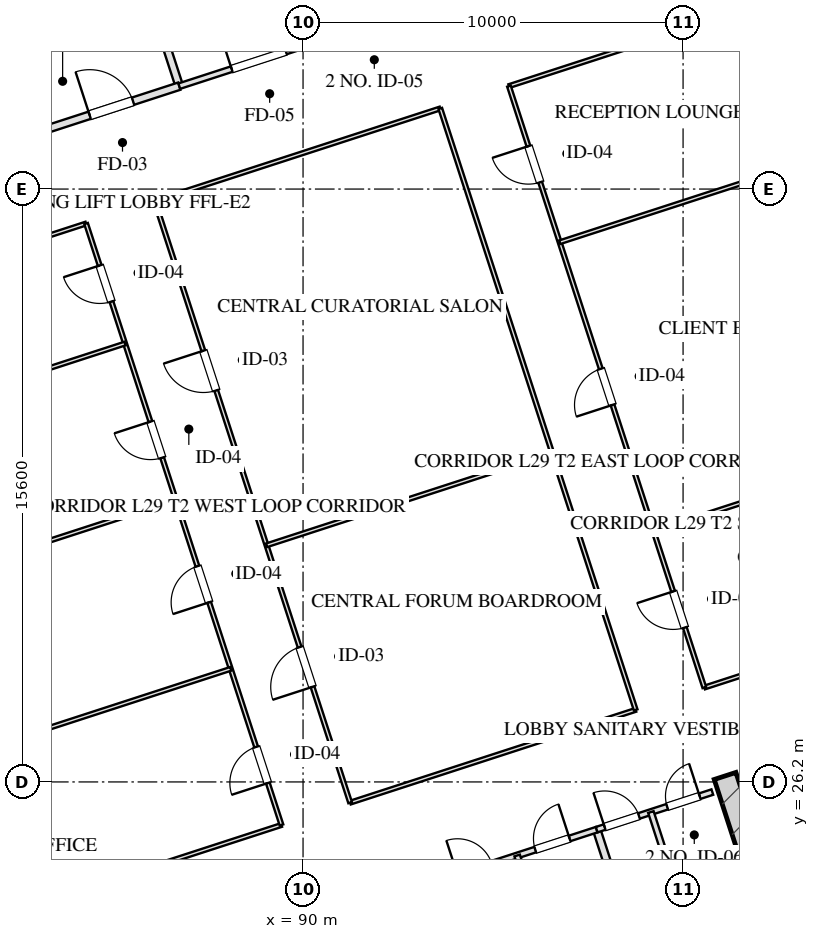
"""IFC4 building model, lengths in metres.
Left out: names, types, materials, properties, quantities, classifications, styles, units other than length and angle.
Written with IfcOpenShell. Run it as: python <this file> out.ifc"""

import sys

from ifc_helpers import new_model, si_unit, direction, frame, frame_2d, origin, place, context, subcontext, project, spatial, rectangle, extrude, element, fill, save


model = new_model("IFC4")
c1 = context("Model", 3, precision=1e-05, world=origin(), true_north=direction((0.0, 1.0)))
c2 = subcontext(c1, "Body", "Model", "MODEL_VIEW")
j1 = project(units=[si_unit("LENGTHUNIT", "METRE"), si_unit("PLANEANGLEUNIT", "RADIAN")], contexts=[c1])
p1 = place(None, origin())
s1 = spatial("IfcSite", under=j1, at=p1, CompositionType="ELEMENT")
p2 = place(p1, origin())
s2 = spatial("IfcBuilding", under=s1, at=p2, CompositionType="ELEMENT")
p3 = place(p2, frame((0.0, 0.0, 113.85)))
s3 = spatial("IfcBuildingStorey", under=s2, at=p3, CompositionType="ELEMENT", Elevation=113.85)
p4 = place(p3, frame((101.105, 26.358, 0.0), z_axis=(0.0, 0.0, 1.0), x_axis=(0.309010370028, -0.95105866865, 0.0)))
e1 = element("IfcWall", 1, at=p4, inside=s3, PredefinedType="SHEAR", context=c2, shape_type="SweptSolid", body=[
    extrude(rectangle(XDim=9.48, YDim=0.6, at=frame_2d((4.74, 0.0))), origin(), (0.0, 0.0, 1.0), 3.45),
])
p5 = place(p3, frame((99.284, 61.41, 0.0), z_axis=(0.0, 0.0, 1.0), x_axis=(0.309017542002, -0.95105633836, 0.0)))
e2 = element("IfcWall", 2, at=p5, inside=s3, PredefinedType="SOLIDWALL", context=c2, shape_type="SweptSolid", body=[
    extrude(rectangle(XDim=46.4, YDim=0.4, at=frame_2d((23.2, 0.0))), origin(), (0.0, 0.0, 1.0), 2.61),
])
p6 = place(p5, frame((28.4, 0.0, 0.75)))
e3 = element("IfcOpeningElement", 3, at=p6, cuts=e2, PredefinedType="OPENING", context=c2, shape_type="SweptSolid", body=[
    extrude(rectangle(XDim=2.4, YDim=1.46, at=frame_2d((1.2, 0.73))), frame((0.0, 0.21, 0.0), z_axis=(0.0, -1.0, 0.0), x_axis=(1.0, 0.0, 0.0)), (0.0, 0.0, 1.0), 0.42),
])
p7 = place(p5, frame((16.85, 0.0, 0.0)))
e4 = element("IfcOpeningElement", 4, at=p7, cuts=e2, PredefinedType="OPENING", context=c2, shape_type="SweptSolid", body=[
    extrude(rectangle(XDim=1.1, YDim=2.15, at=frame_2d((0.55, 1.075))), frame((0.0, 0.21, 0.0), z_axis=(0.0, -1.0, 0.0), x_axis=(1.0, 0.0, 0.0)), (0.0, 0.0, 1.0), 0.42),
])
p8 = place(p3, frame((97.727, 24.944, 0.0), z_axis=(0.0, 0.0, 1.0), x_axis=(0.309016001439, -0.951056838919, 0.0)))
e5 = element("IfcWall", 5, at=p8, inside=s3, PredefinedType="PARTITIONING", context=c2, shape_type="SweptSolid", body=[
    extrude(rectangle(XDim=8.43, YDim=0.2, at=frame_2d((4.215, 0.0))), origin(), (0.0, 0.0, 1.0), 3.175),
])
p9 = place(p3, frame((93.542, 23.585, 0.0), z_axis=(0.0, 0.0, 1.0), x_axis=(0.951063829732, 0.308994485023, 0.0)))
e6 = element("IfcWall", 6, at=p9, inside=s3, PredefinedType="PARTITIONING", context=c2, shape_type="SweptSolid", body=[
    extrude(rectangle(XDim=4.4, YDim=0.15, at=frame_2d((2.2, 0.0))), origin(), (0.0, 0.0, 1.0), 3.175),
])
p10 = place(p9, frame((0.55, 0.0, 0.0)))
e7 = element("IfcOpeningElement", 7, at=p10, cuts=e6, PredefinedType="OPENING", context=c2, shape_type="SweptSolid", body=[
    extrude(rectangle(XDim=0.95, YDim=2.05, at=frame_2d((0.475, 1.025))), frame((0.0, 0.085, 0.0), z_axis=(0.0, -1.0, 0.0), x_axis=(1.0, 0.0, 0.0)), (0.0, 0.0, 1.0), 0.17),
])
p11 = place(p9, frame((2.7, 0.0, 0.0)))
e8 = element("IfcOpeningElement", 8, at=p11, cuts=e6, PredefinedType="OPENING", context=c2, shape_type="SweptSolid", body=[
    extrude(rectangle(XDim=0.95, YDim=2.05, at=frame_2d((0.475, 1.025))), frame((0.0, 0.085, 0.0), z_axis=(0.0, -1.0, 0.0), x_axis=(1.0, 0.0, 0.0)), (0.0, 0.0, 1.0), 0.17),
])
p12 = place(p3, frame((95.634, 24.265, 0.0), z_axis=(0.0, 0.0, 1.0), x_axis=(0.309007490203, -0.951059604335, 0.0)))
e9 = element("IfcWall", 9, at=p12, inside=s3, PredefinedType="PARTITIONING", context=c2, shape_type="SweptSolid", body=[
    extrude(rectangle(XDim=8.43, YDim=0.15, at=frame_2d((4.215, 0.0))), origin(), (0.0, 0.0, 1.0), 3.175),
])
p13 = place(p3, frame((97.727, 24.944, 0.0), z_axis=(0.0, 0.0, 1.0), x_axis=(0.951036872128, 0.309077446369, 0.0)))
e10 = element("IfcWall", 10, at=p13, inside=s3, PredefinedType="PARTITIONING", context=c2, shape_type="SweptSolid", body=[
    extrude(rectangle(XDim=3.2, YDim=0.15, at=frame_2d((1.6, 0.0))), origin(), (0.0, 0.0, 1.0), 3.175),
])
p14 = place(p13, frame((0.22, 0.0, 0.0)))
e11 = element("IfcOpeningElement", 11, at=p14, cuts=e10, PredefinedType="OPENING", context=c2, shape_type="SweptSolid", body=[
    extrude(rectangle(XDim=0.95, YDim=2.05, at=frame_2d((0.475, 1.025))), frame((0.0, 0.085, 0.0), z_axis=(0.0, -1.0, 0.0), x_axis=(1.0, 0.0, 0.0)), (0.0, 0.0, 1.0), 0.17),
])
p15 = place(p13, frame((1.95, 0.0, 0.0)))
e12 = element("IfcOpeningElement", 12, at=p15, cuts=e10, PredefinedType="OPENING", context=c2, shape_type="SweptSolid", body=[
    extrude(rectangle(XDim=0.9, YDim=2.05, at=frame_2d((0.45, 1.025))), frame((0.0, 0.085, 0.0), z_axis=(0.0, -1.0, 0.0), x_axis=(1.0, 0.0, 0.0)), (0.0, 0.0, 1.0), 0.17),
])
p16 = place(p3, frame((99.153, 25.408, 0.0), z_axis=(0.0, 0.0, 1.0), x_axis=(0.309016001439, -0.951056838919, 0.0)))
e13 = element("IfcWall", 13, at=p16, inside=s3, PredefinedType="PARTITIONING", context=c2, shape_type="SweptSolid", body=[
    extrude(rectangle(XDim=8.43, YDim=0.15, at=frame_2d((4.215, 0.0))), origin(), (0.0, 0.0, 1.0), 3.175),
])
p17 = place(p16, frame((2.55, 0.0, 0.0)))
e14 = element("IfcOpeningElement", 14, at=p17, cuts=e13, PredefinedType="OPENING", context=c2, shape_type="SweptSolid", body=[
    extrude(rectangle(XDim=0.95, YDim=2.05, at=frame_2d((0.475, 1.025))), frame((0.0, 0.085, 0.0), z_axis=(0.0, -1.0, 0.0), x_axis=(1.0, 0.0, 0.0)), (0.0, 0.0, 1.0), 0.17),
])
p18 = place(p16, frame((5.6, 0.0, 0.0)))
e15 = element("IfcOpeningElement", 15, at=p18, cuts=e13, PredefinedType="OPENING", context=c2, shape_type="SweptSolid", body=[
    extrude(rectangle(XDim=0.9, YDim=2.05, at=frame_2d((0.45, 1.025))), frame((0.0, 0.085, 0.0), z_axis=(0.0, -1.0, 0.0), x_axis=(1.0, 0.0, 0.0)), (0.0, 0.0, 1.0), 0.17),
])
p19 = place(p3, frame((86.743, 44.508, 0.0), z_axis=(0.0, 0.0, 1.0), x_axis=(-0.309016001439, 0.951056838919, 0.0)))
e16 = element("IfcWall", 16, at=p19, inside=s3, PredefinedType="PARTITIONING", context=c2, shape_type="SweptSolid", body=[
    extrude(rectangle(XDim=8.43, YDim=0.2, at=frame_2d((4.215, 0.0))), origin(), (0.0, 0.0, 1.0), 3.175),
])
p20 = place(p3, frame((83.101, 43.324, 0.0), z_axis=(0.0, 0.0, 1.0), x_axis=(0.951052804469, 0.309028417967, 0.0)))
e17 = element("IfcWall", 17, at=p20, inside=s3, PredefinedType="PARTITIONING", context=c2, shape_type="SweptSolid", body=[
    extrude(rectangle(XDim=3.83, YDim=0.2, at=frame_2d((1.915, 0.0))), origin(), (0.0, 0.0, 1.0), 3.175),
])
p21 = place(p20, frame((1.35, 0.0, 0.0)))
e18 = element("IfcOpeningElement", 18, at=p21, cuts=e17, PredefinedType="OPENING", context=c2, shape_type="SweptSolid", body=[
    extrude(rectangle(XDim=1.2, YDim=2.05, at=frame_2d((0.6, 1.025))), frame((0.0, 0.11, 0.0), z_axis=(0.0, -1.0, 0.0), x_axis=(1.0, 0.0, 0.0)), (0.0, 0.0, 1.0), 0.22),
])
p22 = place(p3, frame((86.743, 44.508, 0.0), z_axis=(0.0, 0.0, 1.0), x_axis=(0.951063829732, 0.308994485023, 0.0)))
e19 = element("IfcWall", 19, at=p22, inside=s3, PredefinedType="PARTITIONING", context=c2, shape_type="SweptSolid", body=[
    extrude(rectangle(XDim=4.4, YDim=0.15, at=frame_2d((2.2, 0.0))), origin(), (0.0, 0.0, 1.0), 3.175),
])
p23 = place(p22, frame((1.45, 0.0, 0.0)))
e20 = element("IfcOpeningElement", 20, at=p23, cuts=e19, PredefinedType="OPENING", context=c2, shape_type="SweptSolid", body=[
    extrude(rectangle(XDim=1.5, YDim=2.05, at=frame_2d((0.75, 1.025))), frame((0.0, 0.085, 0.0), z_axis=(0.0, -1.0, 0.0), x_axis=(1.0, 0.0, 0.0)), (0.0, 0.0, 1.0), 0.17),
])
p24 = place(p3, frame((76.308, 20.803, 0.0), z_axis=(0.0, 0.0, 1.0), x_axis=(0.951058377365, 0.309011266531, 0.0)))
e21 = element("IfcWall", 21, at=p24, inside=s3, PredefinedType="MOVABLE", context=c2, shape_type="SweptSolid", body=[
    extrude(rectangle(XDim=13.8, YDim=0.1, at=frame_2d((6.9, 0.0))), origin(), (0.0, 0.0, 1.0), 3.175),
])
p25 = place(p3, frame((91.24, 25.655, 0.0), z_axis=(0.0, 0.0, 1.0), x_axis=(0.951060182336, 0.309005711233, 0.0)))
e22 = element("IfcWall", 22, at=p25, inside=s3, PredefinedType="MOVABLE", context=c2, shape_type="SweptSolid", body=[
    extrude(rectangle(XDim=7.9, YDim=0.1, at=frame_2d((3.95, 0.0))), origin(), (0.0, 0.0, 1.0), 3.175),
])
p26 = place(p3, frame((100.56, 28.683, 0.0), z_axis=(0.0, 0.0, 1.0), x_axis=(0.951055307445, 0.309020714809, 0.0)))
e23 = element("IfcWall", 23, at=p26, inside=s3, PredefinedType="MOVABLE", context=c2, shape_type="SweptSolid", body=[
    extrude(rectangle(XDim=8.7, YDim=0.1, at=frame_2d((4.35, 0.0))), origin(), (0.0, 0.0, 1.0), 3.175),
])
p27 = place(p3, frame((71.166, 36.629, 0.0), z_axis=(0.0, 0.0, 1.0), x_axis=(0.951056688031, 0.309016465825, 0.0)))
e24 = element("IfcWall", 24, at=p27, inside=s3, PredefinedType="MOVABLE", context=c2, shape_type="SweptSolid", body=[
    extrude(rectangle(XDim=13.8, YDim=0.1, at=frame_2d((6.9, 0.0))), origin(), (0.0, 0.0, 1.0), 3.175),
])
p28 = place(p3, frame((86.097, 41.48, 0.0), z_axis=(0.0, 0.0, 1.0), x_axis=(0.951060182336, 0.309005711233, 0.0)))
e25 = element("IfcWall", 25, at=p28, inside=s3, PredefinedType="MOVABLE", context=c2, shape_type="SweptSolid", body=[
    extrude(rectangle(XDim=7.9, YDim=0.1, at=frame_2d((3.95, 0.0))), origin(), (0.0, 0.0, 1.0), 3.175),
])
p29 = place(p3, frame((95.418, 44.509, 0.0), z_axis=(0.0, 0.0, 1.0), x_axis=(0.951055307445, 0.309020714809, 0.0)))
e26 = element("IfcWall", 26, at=p29, inside=s3, PredefinedType="MOVABLE", context=c2, shape_type="SweptSolid", body=[
    extrude(rectangle(XDim=8.7, YDim=0.1, at=frame_2d((4.35, 0.0))), origin(), (0.0, 0.0, 1.0), 3.175),
])
p30 = place(p3, frame((89.433, 25.067, 0.0), z_axis=(0.0, 0.0, 1.0), x_axis=(-0.30901773025, 0.951056277195, 0.0)))
e27 = element("IfcWall", 27, at=p30, inside=s3, PredefinedType="MOVABLE", context=c2, shape_type="SweptSolid", body=[
    extrude(rectangle(XDim=16.64, YDim=0.1, at=frame_2d((8.32, 0.0))), origin(), (0.0, 0.0, 1.0), 3.175),
])
p31 = place(p30, frame((1.16, 0.0, 0.0)))
e28 = element("IfcOpeningElement", 28, at=p31, cuts=e27, PredefinedType="OPENING", context=c2, shape_type="SweptSolid", body=[
    extrude(rectangle(XDim=1.0, YDim=2.05, at=frame_2d((0.5, 1.025))), frame((0.0, 0.06, 0.0), z_axis=(0.0, -1.0, 0.0), x_axis=(1.0, 0.0, 0.0)), (0.0, 0.0, 1.0), 0.12),
])
p32 = place(p30, frame((6.16, 0.0, 0.0)))
e29 = element("IfcOpeningElement", 29, at=p32, cuts=e27, PredefinedType="OPENING", context=c2, shape_type="SweptSolid", body=[
    extrude(rectangle(XDim=1.0, YDim=2.05, at=frame_2d((0.5, 1.025))), frame((0.0, 0.06, 0.0), z_axis=(0.0, -1.0, 0.0), x_axis=(1.0, 0.0, 0.0)), (0.0, 0.0, 1.0), 0.12),
])
p33 = place(p30, frame((10.16, 0.0, 0.0)))
e30 = element("IfcOpeningElement", 30, at=p33, cuts=e27, PredefinedType="OPENING", context=c2, shape_type="SweptSolid", body=[
    extrude(rectangle(XDim=1.0, YDim=2.05, at=frame_2d((0.5, 1.025))), frame((0.0, 0.06, 0.0), z_axis=(0.0, -1.0, 0.0), x_axis=(1.0, 0.0, 0.0)), (0.0, 0.0, 1.0), 0.12),
])
p34 = place(p30, frame((14.48, 0.0, 0.0)))
e31 = element("IfcOpeningElement", 31, at=p34, cuts=e27, PredefinedType="OPENING", context=c2, shape_type="SweptSolid", body=[
    extrude(rectangle(XDim=1.0, YDim=2.05, at=frame_2d((0.5, 1.025))), frame((0.0, 0.06, 0.0), z_axis=(0.0, -1.0, 0.0), x_axis=(1.0, 0.0, 0.0)), (0.0, 0.0, 1.0), 0.12),
])
p35 = place(p3, frame((91.24, 25.655, 0.0), z_axis=(0.0, 0.0, 1.0), x_axis=(-0.30901773025, 0.951056277195, 0.0)))
e32 = element("IfcWall", 32, at=p35, inside=s3, PredefinedType="MOVABLE", context=c2, shape_type="SweptSolid", body=[
    extrude(rectangle(XDim=16.64, YDim=0.1, at=frame_2d((8.32, 0.0))), origin(), (0.0, 0.0, 1.0), 3.175),
])
p36 = place(p35, frame((3.204, 0.0, 0.0)))
e33 = element("IfcOpeningElement", 33, at=p36, cuts=e32, PredefinedType="OPENING", context=c2, shape_type="SweptSolid", body=[
    extrude(rectangle(XDim=1.1, YDim=2.05, at=frame_2d((0.55, 1.025))), frame((0.0, 0.06, 0.0), z_axis=(0.0, -1.0, 0.0), x_axis=(1.0, 0.0, 0.0)), (0.0, 0.0, 1.0), 0.12),
])
p37 = place(p35, frame((11.404, 0.0, 0.0)))
e34 = element("IfcOpeningElement", 34, at=p37, cuts=e32, PredefinedType="OPENING", context=c2, shape_type="SweptSolid", body=[
    extrude(rectangle(XDim=1.1, YDim=2.05, at=frame_2d((0.55, 1.025))), frame((0.0, 0.06, 0.0), z_axis=(0.0, -1.0, 0.0), x_axis=(1.0, 0.0, 0.0)), (0.0, 0.0, 1.0), 0.12),
])
p38 = place(p3, frame((98.753, 28.096, 0.0), z_axis=(0.0, 0.0, 1.0), x_axis=(-0.30901773025, 0.951056277195, 0.0)))
e35 = element("IfcWall", 35, at=p38, inside=s3, PredefinedType="MOVABLE", context=c2, shape_type="SweptSolid", body=[
    extrude(rectangle(XDim=16.64, YDim=0.1, at=frame_2d((8.32, 0.0))), origin(), (0.0, 0.0, 1.0), 3.175),
])
p39 = place(p3, frame((100.56, 28.683, 0.0), z_axis=(0.0, 0.0, 1.0), x_axis=(-0.309004459387, 0.951060589068, 0.0)))
e36 = element("IfcWall", 36, at=p39, inside=s3, PredefinedType="MOVABLE", context=c2, shape_type="SweptSolid", body=[
    extrude(rectangle(XDim=16.64, YDim=0.1, at=frame_2d((8.32, 0.0))), origin(), (0.0, 0.0, 1.0), 3.175),
])
p40 = place(p39, frame((1.66, 0.0, 0.0)))
e37 = element("IfcOpeningElement", 37, at=p40, cuts=e36, PredefinedType="OPENING", context=c2, shape_type="SweptSolid", body=[
    extrude(rectangle(XDim=1.0, YDim=2.05, at=frame_2d((0.5, 1.025))), frame((0.0, 0.06, 0.0), z_axis=(0.0, -1.0, 0.0), x_axis=(1.0, 0.0, 0.0)), (0.0, 0.0, 1.0), 0.12),
])
p41 = place(p39, frame((7.82, 0.0, 0.0)))
e38 = element("IfcOpeningElement", 38, at=p41, cuts=e36, PredefinedType="OPENING", context=c2, shape_type="SweptSolid", body=[
    extrude(rectangle(XDim=1.0, YDim=2.05, at=frame_2d((0.5, 1.025))), frame((0.0, 0.06, 0.0), z_axis=(0.0, -1.0, 0.0), x_axis=(1.0, 0.0, 0.0)), (0.0, 0.0, 1.0), 0.12),
])
p42 = place(p39, frame((13.98, 0.0, 0.0)))
e39 = element("IfcOpeningElement", 39, at=p42, cuts=e36, PredefinedType="OPENING", context=c2, shape_type="SweptSolid", body=[
    extrude(rectangle(XDim=1.0, YDim=2.05, at=frame_2d((0.5, 1.025))), frame((0.0, 0.06, 0.0), z_axis=(0.0, -1.0, 0.0), x_axis=(1.0, 0.0, 0.0)), (0.0, 0.0, 1.0), 0.12),
])
p43 = place(p3, frame((89.039, 32.426, 0.0), z_axis=(0.0, 0.0, 1.0), x_axis=(0.951051099951, 0.309033663672, 0.0)))
e40 = element("IfcWall", 40, at=p43, inside=s3, PredefinedType="MOVABLE", context=c2, shape_type="SweptSolid", body=[
    extrude(rectangle(XDim=7.9, YDim=0.1, at=frame_2d((3.95, 0.0))), origin(), (0.0, 0.0, 1.0), 3.175),
])
p44 = place(p3, frame((74.973, 24.912, 0.0), z_axis=(0.0, 0.0, 1.0), x_axis=(0.951058377365, 0.309011266531, 0.0)))
e41 = element("IfcWall", 41, at=p44, inside=s3, PredefinedType="MOVABLE", context=c2, shape_type="SweptSolid", body=[
    extrude(rectangle(XDim=13.8, YDim=0.1, at=frame_2d((6.9, 0.0))), origin(), (0.0, 0.0, 1.0), 3.175),
])
for number, where, z_axis, x_axis in (
    (42, (73.527, 29.363, 0.0), (0.0, 0.0, 1.0), (0.951, 0.309, 0.0)),
    (43, (72.192, 33.471, 0.0), (0.0, 0.0, 1.0), (0.951, 0.309, 0.0)),
):
    element("IfcWall", number, at=place(p3, frame(where, z_axis=z_axis, x_axis=x_axis)), inside=s3, PredefinedType="MOVABLE", context=c2, shape_type="SweptSolid", body=[
        extrude(rectangle(XDim=13.8, YDim=0.1, at=frame_2d((6.9, 0.0))), origin(), (0.0, 0.0, 1.0), 3.175),
    ])
p45 = place(p3, frame((99.225, 32.792, 0.0), z_axis=(0.0, 0.0, 1.0), x_axis=(0.951055307445, 0.309020714809, 0.0)))
e44 = element("IfcWall", 44, at=p45, inside=s3, PredefinedType="MOVABLE", context=c2, shape_type="SweptSolid", body=[
    extrude(rectangle(XDim=8.7, YDim=0.1, at=frame_2d((4.35, 0.0))), origin(), (0.0, 0.0, 1.0), 3.175),
])
p46 = place(p3, frame((96.753, 40.4, 0.0), z_axis=(0.0, 0.0, 1.0), x_axis=(0.951057987102, 0.309012467661, 0.0)))
e45 = element("IfcWall", 45, at=p46, inside=s3, PredefinedType="MOVABLE", context=c2, shape_type="SweptSolid", body=[
    extrude(rectangle(XDim=8.7, YDim=0.1, at=frame_2d((4.35, 0.0))), origin(), (0.0, 0.0, 1.0), 3.175),
])
p47 = place(p11, origin())
e46 = element("IfcDoor", 46, at=p47, inside=s3, OperationType="SINGLE_SWING_RIGHT", PredefinedType="DOOR", context=c2, shape_type="SweptSolid", body=[
    extrude(rectangle(XDim=0.95, YDim=2.05, at=frame_2d((0.475, 1.025))), frame((0.0, 0.025, 0.0), z_axis=(0.0, -1.0, 0.0), x_axis=(1.0, 0.0, 0.0)), (0.0, 0.0, 1.0), 0.05),
])
fill(e8, e46)
p48 = place(p14, origin())
e47 = element("IfcDoor", 47, at=p48, inside=s3, OperationType="SINGLE_SWING_LEFT", PredefinedType="DOOR", context=c2, shape_type="SweptSolid", body=[
    extrude(rectangle(XDim=0.95, YDim=2.05, at=frame_2d((0.475, 1.025))), frame((0.0, 0.025, 0.0), z_axis=(0.0, -1.0, 0.0), x_axis=(1.0, 0.0, 0.0)), (0.0, 0.0, 1.0), 0.05),
])
fill(e11, e47)
p49 = place(p15, origin())
e48 = element("IfcDoor", 48, at=p49, inside=s3, OperationType="SINGLE_SWING_RIGHT", PredefinedType="DOOR", context=c2, shape_type="SweptSolid", body=[
    extrude(rectangle(XDim=0.9, YDim=2.05, at=frame_2d((0.45, 1.025))), frame((0.0, 0.025, 0.0), z_axis=(0.0, -1.0, 0.0), x_axis=(1.0, 0.0, 0.0)), (0.0, 0.0, 1.0), 0.05),
])
fill(e12, e48)
p50 = place(p21, origin())
e49 = element("IfcDoor", 49, at=p50, inside=s3, OperationType="SINGLE_SWING_LEFT", PredefinedType="DOOR", context=c2, shape_type="SweptSolid", body=[
    extrude(rectangle(XDim=1.2, YDim=2.05, at=frame_2d((0.6, 1.025))), frame((0.0, 0.025, 0.0), z_axis=(0.0, -1.0, 0.0), x_axis=(1.0, 0.0, 0.0)), (0.0, 0.0, 1.0), 0.05),
])
fill(e18, e49)
p51 = place(p23, origin())
e50 = element("IfcDoor", 50, at=p51, inside=s3, OperationType="SINGLE_SWING_LEFT", PredefinedType="DOOR", context=c2, shape_type="SweptSolid", body=[
    extrude(rectangle(XDim=1.5, YDim=2.05, at=frame_2d((0.75, 1.025))), frame((0.0, 0.025, 0.0), z_axis=(0.0, -1.0, 0.0), x_axis=(1.0, 0.0, 0.0)), (0.0, 0.0, 1.0), 0.05),
])
fill(e20, e50)
p52 = place(p31, origin())
e51 = element("IfcDoor", 51, at=p52, inside=s3, OperationType="SINGLE_SWING_LEFT", PredefinedType="DOOR", context=c2, shape_type="SweptSolid", body=[
    extrude(rectangle(XDim=1.0, YDim=2.05, at=frame_2d((0.5, 1.025))), frame((0.0, 0.025, 0.0), z_axis=(0.0, -1.0, 0.0), x_axis=(1.0, 0.0, 0.0)), (0.0, 0.0, 1.0), 0.05),
])
fill(e28, e51)
p53 = place(p32, origin())
e52 = element("IfcDoor", 52, at=p53, inside=s3, OperationType="SINGLE_SWING_LEFT", PredefinedType="DOOR", context=c2, shape_type="SweptSolid", body=[
    extrude(rectangle(XDim=1.0, YDim=2.05, at=frame_2d((0.5, 1.025))), frame((0.0, 0.025, 0.0), z_axis=(0.0, -1.0, 0.0), x_axis=(1.0, 0.0, 0.0)), (0.0, 0.0, 1.0), 0.05),
])
fill(e29, e52)
p54 = place(p33, origin())
e53 = element("IfcDoor", 53, at=p54, inside=s3, OperationType="SINGLE_SWING_RIGHT", PredefinedType="DOOR", context=c2, shape_type="SweptSolid", body=[
    extrude(rectangle(XDim=1.0, YDim=2.05, at=frame_2d((0.5, 1.025))), frame((0.0, 0.025, 0.0), z_axis=(0.0, -1.0, 0.0), x_axis=(1.0, 0.0, 0.0)), (0.0, 0.0, 1.0), 0.05),
])
fill(e30, e53)
p55 = place(p34, origin())
e54 = element("IfcDoor", 54, at=p55, inside=s3, OperationType="SINGLE_SWING_RIGHT", PredefinedType="DOOR", context=c2, shape_type="SweptSolid", body=[
    extrude(rectangle(XDim=1.0, YDim=2.05, at=frame_2d((0.5, 1.025))), frame((0.0, 0.025, 0.0), z_axis=(0.0, -1.0, 0.0), x_axis=(1.0, 0.0, 0.0)), (0.0, 0.0, 1.0), 0.05),
])
fill(e31, e54)
p56 = place(p36, origin())
e55 = element("IfcDoor", 55, at=p56, inside=s3, OperationType="SINGLE_SWING_LEFT", PredefinedType="DOOR", context=c2, shape_type="SweptSolid", body=[
    extrude(rectangle(XDim=1.1, YDim=2.05, at=frame_2d((0.55, 1.025))), frame((0.0, 0.025, 0.0), z_axis=(0.0, -1.0, 0.0), x_axis=(1.0, 0.0, 0.0)), (0.0, 0.0, 1.0), 0.05),
])
fill(e33, e55)
p57 = place(p37, origin())
e56 = element("IfcDoor", 56, at=p57, inside=s3, OperationType="SINGLE_SWING_RIGHT", PredefinedType="DOOR", context=c2, shape_type="SweptSolid", body=[
    extrude(rectangle(XDim=1.1, YDim=2.05, at=frame_2d((0.55, 1.025))), frame((0.0, 0.025, 0.0), z_axis=(0.0, -1.0, 0.0), x_axis=(1.0, 0.0, 0.0)), (0.0, 0.0, 1.0), 0.05),
])
fill(e34, e56)
p58 = place(p40, origin())
e57 = element("IfcDoor", 57, at=p58, inside=s3, OperationType="SINGLE_SWING_RIGHT", PredefinedType="DOOR", context=c2, shape_type="SweptSolid", body=[
    extrude(rectangle(XDim=1.0, YDim=2.05, at=frame_2d((0.5, 1.025))), frame((0.0, 0.025, 0.0), z_axis=(0.0, -1.0, 0.0), x_axis=(1.0, 0.0, 0.0)), (0.0, 0.0, 1.0), 0.05),
])
fill(e37, e57)
p59 = place(p41, origin())
e58 = element("IfcDoor", 58, at=p59, inside=s3, OperationType="SINGLE_SWING_LEFT", PredefinedType="DOOR", context=c2, shape_type="SweptSolid", body=[
    extrude(rectangle(XDim=1.0, YDim=2.05, at=frame_2d((0.5, 1.025))), frame((0.0, 0.025, 0.0), z_axis=(0.0, -1.0, 0.0), x_axis=(1.0, 0.0, 0.0)), (0.0, 0.0, 1.0), 0.05),
])
fill(e38, e58)
p60 = place(p42, origin())
e59 = element("IfcDoor", 59, at=p60, inside=s3, OperationType="SINGLE_SWING_RIGHT", PredefinedType="DOOR", context=c2, shape_type="SweptSolid", body=[
    extrude(rectangle(XDim=1.0, YDim=2.05, at=frame_2d((0.5, 1.025))), frame((0.0, 0.025, 0.0), z_axis=(0.0, -1.0, 0.0), x_axis=(1.0, 0.0, 0.0)), (0.0, 0.0, 1.0), 0.05),
])
fill(e39, e59)
save(model, sys.argv[1])
